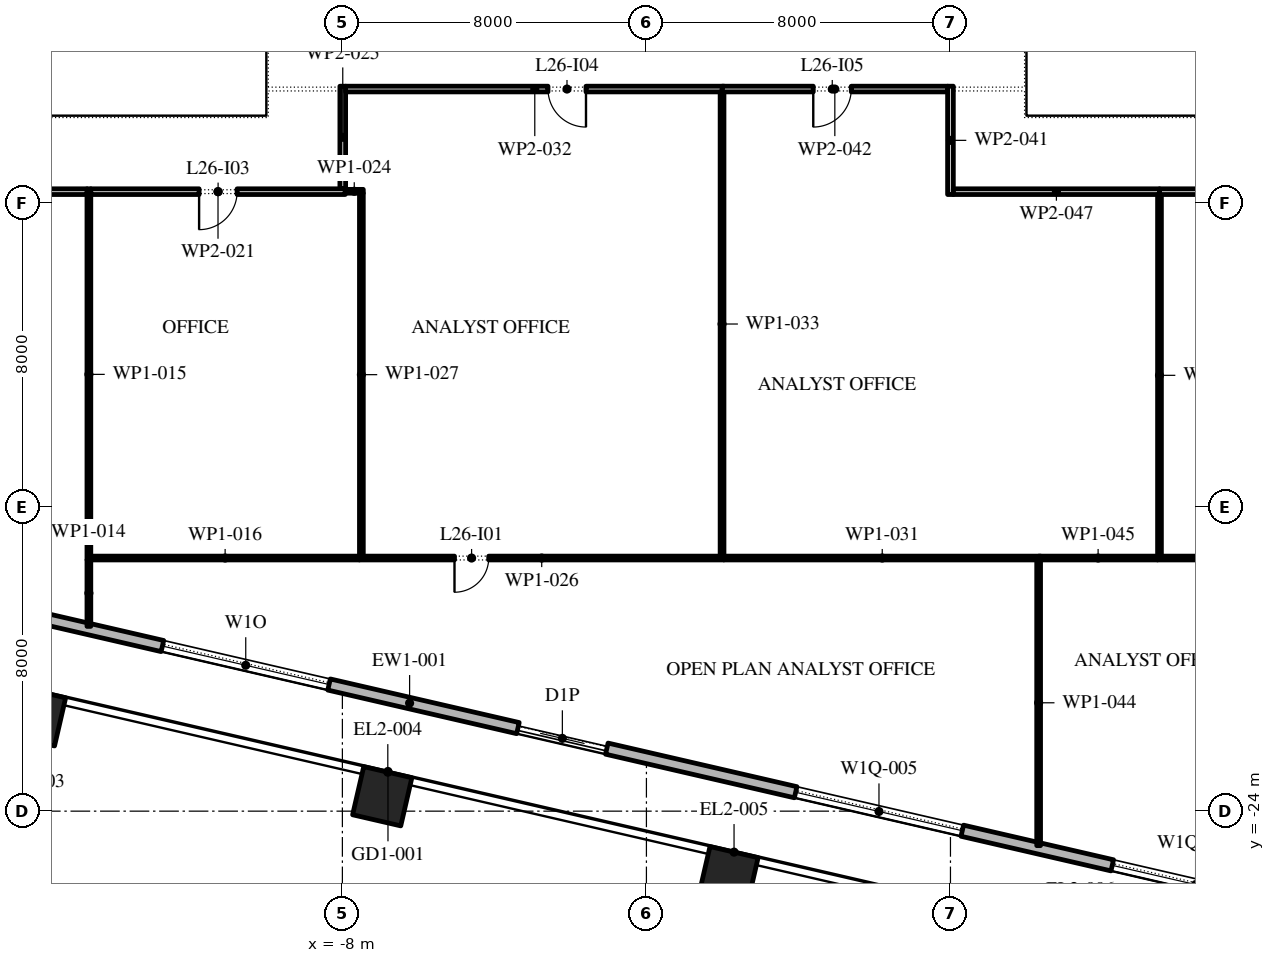
"""IFC4 building model, lengths in metres.
Left out: names, types, materials, properties, quantities, classifications, styles, units other than length and angle.
Written with IfcOpenShell. Run it as: python <this file> out.ifc"""

import sys

from ifc_helpers import new_model, si_unit, direction, frame, frame_2d, origin, origin_2d, place, context, subcontext, project, spatial, rectangle, extrude, element, fill, save


model = new_model("IFC4")
c1 = context("Model", 3, precision=1e-05, world=origin(), true_north=direction((0.0, 1.0)))
c2 = subcontext(c1, "Body", "Model", "MODEL_VIEW")
j1 = project(units=[si_unit("LENGTHUNIT", "METRE"), si_unit("PLANEANGLEUNIT", "RADIAN")], contexts=[c1])
p1 = place(None, origin())
s1 = spatial("IfcSite", under=j1, at=p1, CompositionType="ELEMENT")
p2 = place(p1, origin())
s2 = spatial("IfcBuilding", under=s1, at=p2, CompositionType="ELEMENT")
p3 = place(p2, frame((0.0, 0.0, 122.4)))
s3 = spatial("IfcBuildingStorey", under=s2, at=p3, CompositionType="ELEMENT", Elevation=122.4)
for number, where, z_axis, x_axis in (
    (1, (-16.061, -21.505, 0.0), (0.0, 0.0, 1.0), (0.974, -0.225, 0.0)),
    (2, (-6.951, -23.608, 0.0), (0.0, 0.0, 1.0), (0.974, -0.225, 0.0)),
    (3, (2.159, -25.711, 0.0), (0.0, 0.0, 1.0), (0.974, -0.225, 0.0)),
):
    element("IfcColumn", number, at=place(p3, frame(where, z_axis=z_axis, x_axis=x_axis)), inside=s3, PredefinedType="COLUMN", context=c2, shape_type="SweptSolid", body=[
        extrude(rectangle(XDim=1.3, YDim=1.3, at=origin_2d()), origin(), (0.0, 0.0, 1.0), 4.2),
    ])
p4 = place(p3, frame((-31.078, -15.421, 0.0), z_axis=(0.0, 0.0, 1.0), x_axis=(0.974370456532, -0.224949357493, 0.0)))
e4 = element("IfcWall", 4, at=p4, inside=s3, PredefinedType="STANDARD", context=c2, shape_type="SweptSolid", body=[
    extrude(rectangle(XDim=51.0, YDim=0.3, at=frame_2d((25.5, 0.0))), origin(), (0.0, 0.0, 1.0), 4.0),
])
p5 = place(p4, frame((1.875, 0.0, 0.45)))
e5 = element("IfcOpeningElement", 5, at=p5, cuts=e4, PredefinedType="OPENING", context=c2, shape_type="SweptSolid", body=[
    extrude(rectangle(XDim=4.5, YDim=2.65, at=frame_2d((2.25, 1.325))), frame((0.0, 0.16, 0.0), z_axis=(0.0, -1.0, 0.0), x_axis=(1.0, 0.0, 0.0)), (0.0, 0.0, 1.0), 0.32),
])
p6 = place(p4, frame((10.275, 0.0, 0.45)))
e6 = element("IfcOpeningElement", 6, at=p6, cuts=e4, PredefinedType="OPENING", context=c2, shape_type="SweptSolid", body=[
    extrude(rectangle(XDim=4.5, YDim=2.525, at=frame_2d((2.25, 1.262))), frame((0.0, 0.16, 0.0), z_axis=(0.0, -1.0, 0.0), x_axis=(1.0, 0.0, 0.0)), (0.0, 0.0, 1.0), 0.32),
])
p7 = place(p4, frame((18.825, 0.0, 0.45)))
e7 = element("IfcOpeningElement", 7, at=p7, cuts=e4, PredefinedType="OPENING", context=c2, shape_type="SweptSolid", body=[
    extrude(rectangle(XDim=4.5, YDim=2.5, at=frame_2d((2.25, 1.25))), frame((0.0, 0.16, 0.0), z_axis=(0.0, -1.0, 0.0), x_axis=(1.0, 0.0, 0.0)), (0.0, 0.0, 1.0), 0.32),
])
p8 = place(p4, frame((28.425, 0.0, 0.0)))
e8 = element("IfcOpeningElement", 8, at=p8, cuts=e4, PredefinedType="OPENING", context=c2, shape_type="SweptSolid", body=[
    extrude(rectangle(XDim=2.4, YDim=2.9, at=frame_2d((1.2, 1.45))), frame((0.0, 0.16, 0.0), z_axis=(0.0, -1.0, 0.0), x_axis=(1.0, 0.0, 0.0)), (0.0, 0.0, 1.0), 0.32),
])
p9 = place(p4, frame((35.925, 0.0, 0.45)))
e9 = element("IfcOpeningElement", 9, at=p9, cuts=e4, PredefinedType="OPENING", context=c2, shape_type="SweptSolid", body=[
    extrude(rectangle(XDim=4.5, YDim=2.45, at=frame_2d((2.25, 1.225))), frame((0.0, 0.16, 0.0), z_axis=(0.0, -1.0, 0.0), x_axis=(1.0, 0.0, 0.0)), (0.0, 0.0, 1.0), 0.32),
])
p10 = place(p4, frame((44.475, 0.0, 0.45)))
e10 = element("IfcOpeningElement", 10, at=p10, cuts=e4, PredefinedType="OPENING", context=c2, shape_type="SweptSolid", body=[
    extrude(rectangle(XDim=4.5, YDim=2.45, at=frame_2d((2.25, 1.225))), frame((0.0, 0.16, 0.0), z_axis=(0.0, -1.0, 0.0), x_axis=(1.0, 0.0, 0.0)), (0.0, 0.0, 1.0), 0.32),
])
p11 = place(p3, frame((-14.67, -19.138, 0.0), z_axis=(0.0, 0.0, 1.0), x_axis=(0.0, 1.0, 0.0)))
e11 = element("IfcWall", 11, at=p11, inside=s3, PredefinedType="PARTITIONING", context=c2, shape_type="SweptSolid", body=[
    extrude(rectangle(XDim=1.748, YDim=0.1, at=frame_2d((0.874, 0.0))), origin(), (0.0, 0.0, 1.0), 4.0),
])
p12 = place(p3, frame((-14.67, -17.39, 0.0), z_axis=(0.0, 0.0, 1.0), x_axis=(0.0, 1.0, 0.0)))
e12 = element("IfcWall", 12, at=p12, inside=s3, PredefinedType="PARTITIONING", context=c2, shape_type="SweptSolid", body=[
    extrude(rectangle(XDim=9.765, YDim=0.1, at=frame_2d((4.882, 0.0))), origin(), (0.0, 0.0, 1.0), 4.0),
])
p13 = place(p3, frame((-14.62, -17.34, 0.0), z_axis=(0.0, 0.0, 1.0), x_axis=(1.0, 0.0, 0.0)))
e13 = element("IfcWall", 13, at=p13, inside=s3, PredefinedType="PARTITIONING", context=c2, shape_type="SweptSolid", body=[
    extrude(rectangle(XDim=7.07, YDim=0.1, at=frame_2d((3.535, 0.0))), origin(), (0.0, 0.0, 1.0), 4.0),
])
p14 = place(p3, frame((-14.72, -7.7, 0.0), z_axis=(0.0, 0.0, 1.0), x_axis=(-1.0, 0.0, 0.0)))
e14 = element("IfcWall", 14, at=p14, inside=s3, PredefinedType="PARTITIONING", context=c2, shape_type="SweptSolid", body=[
    extrude(rectangle(XDim=8.24, YDim=0.15, at=frame_2d((4.12, 0.0))), origin(), (0.0, 0.0, 1.0), 4.0),
])
p15 = place(p14, frame((5.39, 0.0, 0.0)))
e15 = element("IfcOpeningElement", 15, at=p15, cuts=e14, PredefinedType="OPENING", context=c2, shape_type="SweptSolid", body=[
    extrude(rectangle(XDim=1.0, YDim=2.1, at=frame_2d((0.5, 1.05))), frame((0.0, 0.085, 0.0), z_axis=(0.0, -1.0, 0.0), x_axis=(1.0, 0.0, 0.0)), (0.0, 0.0, 1.0), 0.17),
])
p16 = place(p3, frame((-7.925, -7.7, 0.0), z_axis=(0.0, 0.0, 1.0), x_axis=(-1.0, 0.0, 0.0)))
e16 = element("IfcWall", 16, at=p16, inside=s3, PredefinedType="PARTITIONING", context=c2, shape_type="SweptSolid", body=[
    extrude(rectangle(XDim=6.695, YDim=0.15, at=frame_2d((3.348, 0.0))), origin(), (0.0, 0.0, 1.0), 4.0),
])
p17 = place(p16, frame((2.845, 0.0, 0.0)))
e17 = element("IfcOpeningElement", 17, at=p17, cuts=e16, PredefinedType="OPENING", context=c2, shape_type="SweptSolid", body=[
    extrude(rectangle(XDim=1.0, YDim=2.1, at=frame_2d((0.5, 1.05))), frame((0.0, 0.085, 0.0), z_axis=(0.0, -1.0, 0.0), x_axis=(1.0, 0.0, 0.0)), (0.0, 0.0, 1.0), 0.17),
])
p18 = place(p3, frame((-7.925, -7.69, 0.0), z_axis=(0.0, 0.0, 1.0), x_axis=(1.0, 0.0, 0.0)))
e18 = element("IfcWall", 18, at=p18, inside=s3, PredefinedType="PARTITIONING", context=c2, shape_type="SweptSolid", body=[
    extrude(rectangle(XDim=0.475, YDim=0.1, at=frame_2d((0.238, 0.0))), origin(), (0.0, 0.0, 1.0), 4.0),
])
p19 = place(p3, frame((-7.99, -4.925, 0.0), z_axis=(0.0, 0.0, 1.0), x_axis=(0.0, -1.0, 0.0)))
e19 = element("IfcWall", 19, at=p19, inside=s3, PredefinedType="PARTITIONING", context=c2, shape_type="SweptSolid", body=[
    extrude(rectangle(XDim=2.69, YDim=0.15, at=frame_2d((1.345, 0.0))), origin(), (0.0, 0.0, 1.0), 4.0),
])
p20 = place(p3, frame((-7.55, -17.34, 0.0), z_axis=(0.0, 0.0, 1.0), x_axis=(1.0, 0.0, 0.0)))
e20 = element("IfcWall", 20, at=p20, inside=s3, PredefinedType="PARTITIONING", context=c2, shape_type="SweptSolid", body=[
    extrude(rectangle(XDim=9.59, YDim=0.1, at=frame_2d((4.795, 0.0))), origin(), (0.0, 0.0, 1.0), 4.0),
])
p21 = place(p20, frame((2.5, 0.0, 0.0)))
e21 = element("IfcOpeningElement", 21, at=p21, cuts=e20, PredefinedType="OPENING", context=c2, shape_type="SweptSolid", body=[
    extrude(rectangle(XDim=0.9, YDim=2.1, at=frame_2d((0.45, 1.05))), frame((0.0, 0.06, 0.0), z_axis=(0.0, -1.0, 0.0), x_axis=(1.0, 0.0, 0.0)), (0.0, 0.0, 1.0), 0.12),
])
p22 = place(p3, frame((-7.5, -7.74, 0.0), z_axis=(0.0, 0.0, 1.0), x_axis=(0.0, -1.0, 0.0)))
e22 = element("IfcWall", 22, at=p22, inside=s3, PredefinedType="PARTITIONING", context=c2, shape_type="SweptSolid", body=[
    extrude(rectangle(XDim=9.55, YDim=0.1, at=frame_2d((4.775, 0.0))), origin(), (0.0, 0.0, 1.0), 4.0),
])
p23 = place(p3, frame((2.04, -17.34, 0.0), z_axis=(0.0, 0.0, 1.0), x_axis=(1.0, 0.0, 0.0)))
e23 = element("IfcWall", 23, at=p23, inside=s3, PredefinedType="PARTITIONING", context=c2, shape_type="SweptSolid", body=[
    extrude(rectangle(XDim=8.33, YDim=0.1, at=frame_2d((4.165, 0.0))), origin(), (0.0, 0.0, 1.0), 4.0),
])
p24 = place(p3, frame((2.04, -5.0, 0.0), z_axis=(0.0, 0.0, 1.0), x_axis=(-1.0, 0.0, 0.0)))
e24 = element("IfcWall", 24, at=p24, inside=s3, PredefinedType="PARTITIONING", context=c2, shape_type="SweptSolid", body=[
    extrude(rectangle(XDim=9.955, YDim=0.15, at=frame_2d((4.978, 0.0))), origin(), (0.0, 0.0, 1.0), 4.0),
])
p25 = place(p24, frame((3.63, 0.0, 0.0)))
e25 = element("IfcOpeningElement", 25, at=p25, cuts=e24, PredefinedType="OPENING", context=c2, shape_type="SweptSolid", body=[
    extrude(rectangle(XDim=1.0, YDim=2.1, at=frame_2d((0.5, 1.05))), frame((0.0, 0.085, 0.0), z_axis=(0.0, -1.0, 0.0), x_axis=(1.0, 0.0, 0.0)), (0.0, 0.0, 1.0), 0.17),
])
p26 = place(p3, frame((1.99, -5.075, 0.0), z_axis=(0.0, 0.0, 1.0), x_axis=(0.0, -1.0, 0.0)))
e26 = element("IfcWall", 26, at=p26, inside=s3, PredefinedType="PARTITIONING", context=c2, shape_type="SweptSolid", body=[
    extrude(rectangle(XDim=12.215, YDim=0.1, at=frame_2d((6.107, 0.0))), origin(), (0.0, 0.0, 1.0), 4.0),
])
p27 = place(p3, frame((8.0, -7.775, 0.0), z_axis=(0.0, 0.0, 1.0), x_axis=(0.0, 1.0, 0.0)))
e27 = element("IfcWall", 27, at=p27, inside=s3, PredefinedType="PARTITIONING", context=c2, shape_type="SweptSolid", body=[
    extrude(rectangle(XDim=2.85, YDim=0.15, at=frame_2d((1.425, 0.0))), origin(), (0.0, 0.0, 1.0), 4.0),
])
p28 = place(p3, frame((7.925, -5.0, 0.0), z_axis=(0.0, 0.0, 1.0), x_axis=(-1.0, 0.0, 0.0)))
e28 = element("IfcWall", 28, at=p28, inside=s3, PredefinedType="PARTITIONING", context=c2, shape_type="SweptSolid", body=[
    extrude(rectangle(XDim=5.935, YDim=0.15, at=frame_2d((2.968, 0.0))), origin(), (0.0, 0.0, 1.0), 4.0),
])
p29 = place(p28, frame((2.535, 0.0, 0.0)))
e29 = element("IfcOpeningElement", 29, at=p29, cuts=e28, PredefinedType="OPENING", context=c2, shape_type="SweptSolid", body=[
    extrude(rectangle(XDim=1.0, YDim=2.1, at=frame_2d((0.5, 1.05))), frame((0.0, 0.085, 0.0), z_axis=(0.0, -1.0, 0.0), x_axis=(1.0, 0.0, 0.0)), (0.0, 0.0, 1.0), 0.17),
])
p30 = place(p3, frame((10.32, -17.39, 0.0), z_axis=(0.0, 0.0, 1.0), x_axis=(0.0, -1.0, 0.0)))
e30 = element("IfcWall", 30, at=p30, inside=s3, PredefinedType="PARTITIONING", context=c2, shape_type="SweptSolid", body=[
    extrude(rectangle(XDim=7.517, YDim=0.1, at=frame_2d((3.759, 0.0))), origin(), (0.0, 0.0, 1.0), 4.0),
])
p31 = place(p3, frame((10.32, -17.34, 0.0), z_axis=(0.0, 0.0, 1.0), x_axis=(1.0, 0.0, 0.0)))
e31 = element("IfcWall", 31, at=p31, inside=s3, PredefinedType="PARTITIONING", context=c2, shape_type="SweptSolid", body=[
    extrude(rectangle(XDim=3.13, YDim=0.1, at=frame_2d((1.565, 0.0))), origin(), (0.0, 0.0, 1.0), 4.0),
])
p32 = place(p3, frame((13.45, -17.34, 0.0), z_axis=(0.0, 0.0, 1.0), x_axis=(1.0, 0.0, 0.0)))
e32 = element("IfcWall", 32, at=p32, inside=s3, PredefinedType="PARTITIONING", context=c2, shape_type="SweptSolid", body=[
    extrude(rectangle(XDim=10.1, YDim=0.1, at=frame_2d((5.05, 0.0))), origin(), (0.0, 0.0, 1.0), 4.0),
])
p33 = place(p32, frame((4.5, 0.0, 0.0)))
e33 = element("IfcOpeningElement", 33, at=p33, cuts=e32, PredefinedType="OPENING", context=c2, shape_type="SweptSolid", body=[
    extrude(rectangle(XDim=0.9, YDim=2.1, at=frame_2d((0.45, 1.05))), frame((0.0, 0.06, 0.0), z_axis=(0.0, -1.0, 0.0), x_axis=(1.0, 0.0, 0.0)), (0.0, 0.0, 1.0), 0.12),
])
p34 = place(p3, frame((13.5, -7.7, 0.0), z_axis=(0.0, 0.0, 1.0), x_axis=(-1.0, 0.0, 0.0)))
e34 = element("IfcWall", 34, at=p34, inside=s3, PredefinedType="PARTITIONING", context=c2, shape_type="SweptSolid", body=[
    extrude(rectangle(XDim=5.425, YDim=0.15, at=frame_2d((2.712, 0.0))), origin(), (0.0, 0.0, 1.0), 4.0),
])
p35 = place(p3, frame((13.5, -7.775, 0.0), z_axis=(0.0, 0.0, 1.0), x_axis=(0.0, -1.0, 0.0)))
e35 = element("IfcWall", 35, at=p35, inside=s3, PredefinedType="PARTITIONING", context=c2, shape_type="SweptSolid", body=[
    extrude(rectangle(XDim=9.515, YDim=0.1, at=frame_2d((4.758, 0.0))), origin(), (0.0, 0.0, 1.0), 4.0),
])
p36 = place(p3, frame((23.55, -7.7, 0.0), z_axis=(0.0, 0.0, 1.0), x_axis=(-1.0, 0.0, 0.0)))
e36 = element("IfcWall", 36, at=p36, inside=s3, PredefinedType="PARTITIONING", context=c2, shape_type="SweptSolid", body=[
    extrude(rectangle(XDim=10.05, YDim=0.15, at=frame_2d((5.025, 0.0))), origin(), (0.0, 0.0, 1.0), 4.0),
])
p37 = place(p36, frame((2.65, 0.0, 0.0)))
e37 = element("IfcOpeningElement", 37, at=p37, cuts=e36, PredefinedType="OPENING", context=c2, shape_type="SweptSolid", body=[
    extrude(rectangle(XDim=1.0, YDim=2.1, at=frame_2d((0.5, 1.05))), frame((0.0, 0.085, 0.0), z_axis=(0.0, -1.0, 0.0), x_axis=(1.0, 0.0, 0.0)), (0.0, 0.0, 1.0), 0.17),
])
p38 = place(p7, origin())
e38 = element("IfcWindow", 38, at=p38, inside=s3, PartitioningType="DOUBLE_PANEL_VERTICAL", PredefinedType="WINDOW", context=c2, shape_type="SweptSolid", body=[
    extrude(rectangle(XDim=4.5, YDim=2.5, at=frame_2d((2.25, 1.25))), frame((0.0, 0.03, 0.0), z_axis=(0.0, -1.0, 0.0), x_axis=(1.0, 0.0, 0.0)), (0.0, 0.0, 1.0), 0.06),
])
fill(e7, e38)
p39 = place(p8, origin())
e39 = element("IfcDoor", 39, at=p39, inside=s3, OperationType="DOUBLE_DOOR_SLIDING", PredefinedType="DOOR", context=c2, shape_type="SweptSolid", body=[
    extrude(rectangle(XDim=2.4, YDim=2.9, at=frame_2d((1.2, 1.45))), frame((0.0, 0.025, 0.0), z_axis=(0.0, -1.0, 0.0), x_axis=(1.0, 0.0, 0.0)), (0.0, 0.0, 1.0), 0.05),
])
fill(e8, e39)
p40 = place(p9, origin())
e40 = element("IfcWindow", 40, at=p40, inside=s3, PartitioningType="DOUBLE_PANEL_VERTICAL", PredefinedType="WINDOW", context=c2, shape_type="SweptSolid", body=[
    extrude(rectangle(XDim=4.5, YDim=2.45, at=frame_2d((2.25, 1.225))), frame((0.0, 0.03, 0.0), z_axis=(0.0, -1.0, 0.0), x_axis=(1.0, 0.0, 0.0)), (0.0, 0.0, 1.0), 0.06),
])
fill(e9, e40)
p41 = place(p10, origin())
e41 = element("IfcWindow", 41, at=p41, inside=s3, PartitioningType="DOUBLE_PANEL_VERTICAL", PredefinedType="WINDOW", context=c2, shape_type="SweptSolid", body=[
    extrude(rectangle(XDim=4.5, YDim=2.45, at=frame_2d((2.25, 1.225))), frame((0.0, 0.03, 0.0), z_axis=(0.0, -1.0, 0.0), x_axis=(1.0, 0.0, 0.0)), (0.0, 0.0, 1.0), 0.06),
])
fill(e10, e41)
p42 = place(p21, frame((0.9, 0.0, 0.0), z_axis=(0.0, 0.0, 1.0), x_axis=(-1.0, 0.0, 0.0)))
e42 = element("IfcDoor", 42, at=p42, inside=s3, OperationType="SINGLE_SWING_LEFT", PredefinedType="DOOR", context=c2, shape_type="SweptSolid", body=[
    extrude(rectangle(XDim=0.9, YDim=2.1, at=frame_2d((0.45, 1.05))), frame((0.0, 0.025, 0.0), z_axis=(0.0, -1.0, 0.0), x_axis=(1.0, 0.0, 0.0)), (0.0, 0.0, 1.0), 0.05),
])
fill(e21, e42)
p43 = place(p17, origin())
e43 = element("IfcDoor", 43, at=p43, inside=s3, OperationType="SINGLE_SWING_LEFT", PredefinedType="DOOR", context=c2, shape_type="SweptSolid", body=[
    extrude(rectangle(XDim=1.0, YDim=2.1, at=frame_2d((0.5, 1.05))), frame((0.0, 0.025, 0.0), z_axis=(0.0, -1.0, 0.0), x_axis=(1.0, 0.0, 0.0)), (0.0, 0.0, 1.0), 0.05),
])
fill(e17, e43)
p44 = place(p25, origin())
e44 = element("IfcDoor", 44, at=p44, inside=s3, OperationType="SINGLE_SWING_RIGHT", PredefinedType="DOOR", context=c2, shape_type="SweptSolid", body=[
    extrude(rectangle(XDim=1.0, YDim=2.1, at=frame_2d((0.5, 1.05))), frame((0.0, 0.025, 0.0), z_axis=(0.0, -1.0, 0.0), x_axis=(1.0, 0.0, 0.0)), (0.0, 0.0, 1.0), 0.05),
])
fill(e25, e44)
p45 = place(p29, origin())
e45 = element("IfcDoor", 45, at=p45, inside=s3, OperationType="SINGLE_SWING_LEFT", PredefinedType="DOOR", context=c2, shape_type="SweptSolid", body=[
    extrude(rectangle(XDim=1.0, YDim=2.1, at=frame_2d((0.5, 1.05))), frame((0.0, 0.025, 0.0), z_axis=(0.0, -1.0, 0.0), x_axis=(1.0, 0.0, 0.0)), (0.0, 0.0, 1.0), 0.05),
])
fill(e29, e45)
save(model, sys.argv[1])
